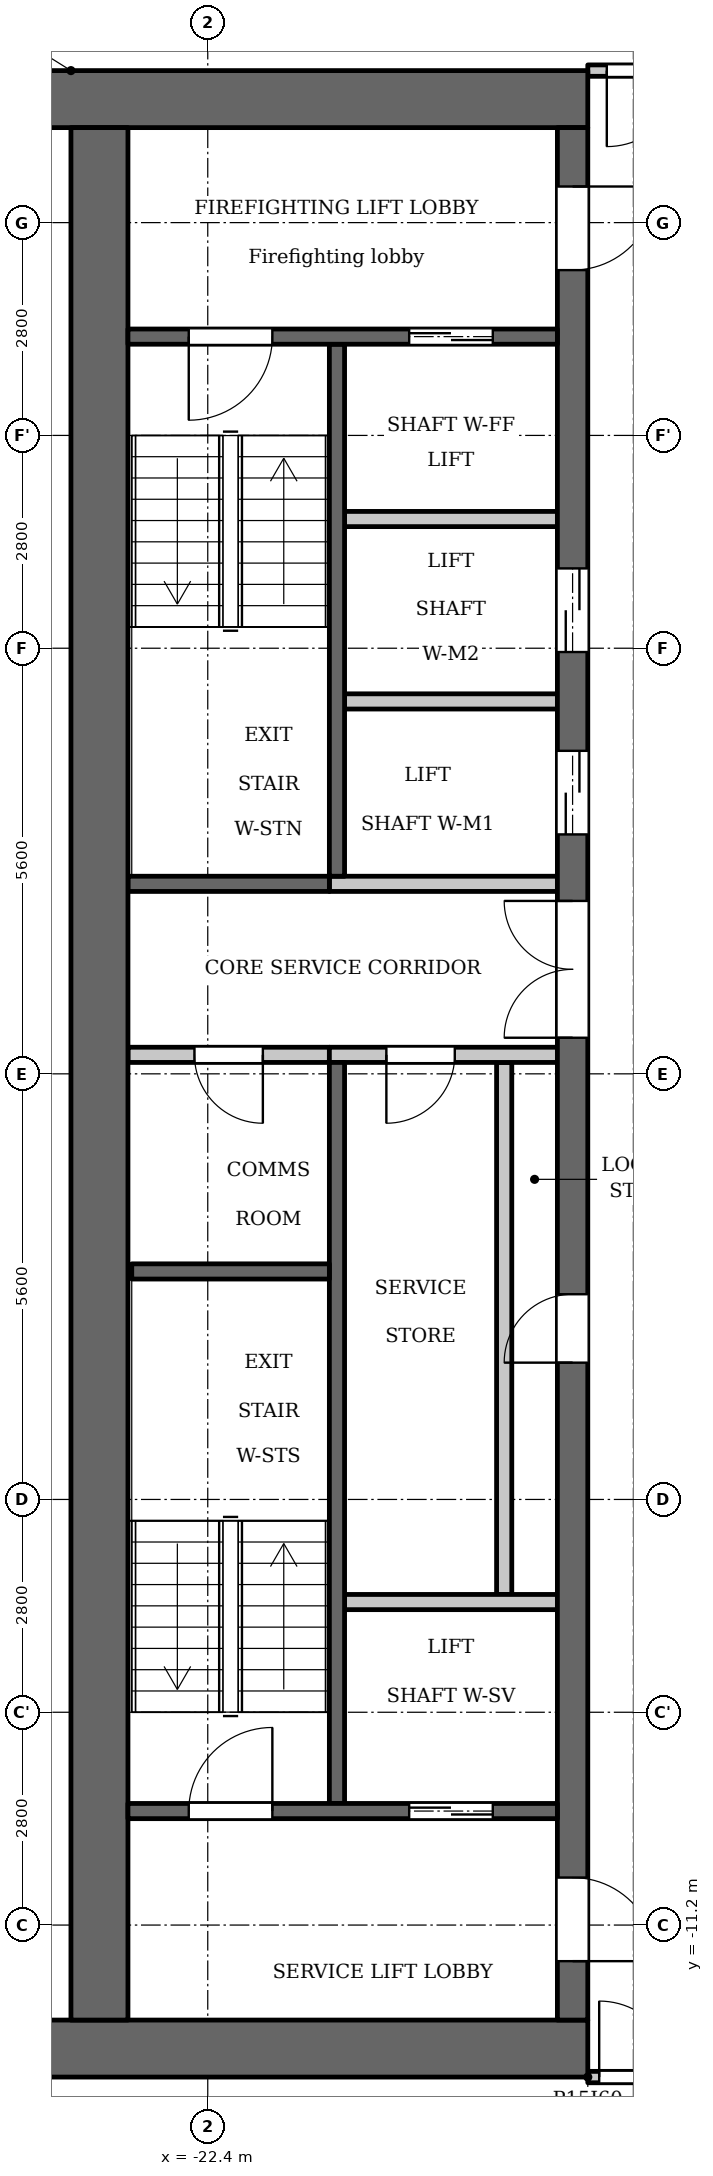
"""IFC4 building model, lengths in metres.
Left out: names, types, materials, properties, quantities, classifications, styles, units other than length and angle.
Written with IfcOpenShell. Run it as: python <this file> out.ifc"""

import sys

from ifc_helpers import new_model, si_unit, direction, frame, frame_2d, origin, place, context, subcontext, project, spatial, rectangle, extrude, element, fill, save


model = new_model("IFC4")
c1 = context("Model", 3, precision=1e-05, world=origin(), true_north=direction((0.0, 1.0)))
c2 = subcontext(c1, "Body", "Model", "MODEL_VIEW")
j1 = project(units=[si_unit("LENGTHUNIT", "METRE"), si_unit("PLANEANGLEUNIT", "RADIAN")], contexts=[c1])
p1 = place(None, origin())
s1 = spatial("IfcSite", under=j1, at=p1, CompositionType="ELEMENT")
p2 = place(p1, origin())
s2 = spatial("IfcBuilding", under=s1, at=p2, CompositionType="ELEMENT")
p3 = place(p2, frame((0.0, 0.0, 206.4)))
s3 = spatial("IfcBuildingStorey", under=s2, at=p3, CompositionType="ELEMENT", Elevation=206.4)
p4 = place(p3, frame((-20.7, 2.6, 0.0), z_axis=(0.0, 0.0, 1.0), x_axis=(0.0, 1.0, 0.0)))
e1 = element("IfcWall", 1, at=p4, inside=s3, PredefinedType="SHEAR", context=c2, shape_type="SweptSolid", body=[
    extrude(rectangle(XDim=7.0, YDim=0.2, at=frame_2d((3.5, 0.0))), origin(), (0.0, 0.0, 1.0), 3.2),
])
p5 = place(p3, frame((-20.7, -9.6, 0.0), z_axis=(0.0, 0.0, 1.0), x_axis=(0.0, 1.0, 0.0)))
e2 = element("IfcWall", 2, at=p5, inside=s3, PredefinedType="SHEAR", context=c2, shape_type="SweptSolid", body=[
    extrude(rectangle(XDim=9.75, YDim=0.2, at=frame_2d((4.875, 0.0))), origin(), (0.0, 0.0, 1.0), 3.2),
])
p6 = place(p3, frame((-20.8, 2.5, 0.0), z_axis=(0.0, 0.0, 1.0), x_axis=(-1.0, 0.0, 0.0)))
e3 = element("IfcWall", 3, at=p6, inside=s3, PredefinedType="SHEAR", context=c2, shape_type="SweptSolid", body=[
    extrude(rectangle(XDim=2.65, YDim=0.2, at=frame_2d((1.325, 0.0))), origin(), (0.0, 0.0, 1.0), 3.2),
])
p7 = place(p3, frame((-20.8, 0.25, 0.0), z_axis=(0.0, 0.0, 1.0), x_axis=(-1.0, 0.0, 0.0)))
e4 = element("IfcWall", 4, at=p7, inside=s3, PredefinedType="PARTITIONING", context=c2, shape_type="SweptSolid", body=[
    extrude(rectangle(XDim=2.65, YDim=0.2, at=frame_2d((1.325, 0.0))), origin(), (0.0, 0.0, 1.0), 3.2),
])
p8 = place(p7, frame((0.875, 0.0, 0.0)))
e5 = element("IfcOpeningElement", 5, at=p8, cuts=e4, PredefinedType="OPENING", context=c2, shape_type="SweptSolid", body=[
    extrude(rectangle(XDim=0.9, YDim=2.1, at=frame_2d((0.45, 1.05))), frame((0.0, 0.11, 0.0), z_axis=(0.0, -1.0, 0.0), x_axis=(1.0, 0.0, 0.0)), (0.0, 0.0, 1.0), 0.22),
])
for number, where, z_axis, x_axis in (
    (6, (-17.4, 12.825, 0.0), (0.0, 0.0, 1.0), (-1.0, 0.0, 0.0)),
    (7, (-17.4, -12.825, 0.0), (0.0, 0.0, 1.0), (-1.0, 0.0, 0.0)),
):
    element("IfcWall", number, at=place(p3, frame(where, z_axis=z_axis, x_axis=x_axis)), inside=s3, PredefinedType="SHEAR", context=c2, shape_type="SweptSolid", body=[
        extrude(rectangle(XDim=7.6, YDim=0.75, at=frame_2d((3.8, 0.0))), origin(), (0.0, 0.0, 1.0), 3.2),
    ])
p9 = place(p3, frame((-18.5, -6.85, 0.0), z_axis=(0.0, 0.0, 1.0), x_axis=(0.0, 1.0, 0.0)))
e8 = element("IfcWall", 8, at=p9, inside=s3, PredefinedType="PARTITIONING", context=c2, shape_type="SweptSolid", body=[
    extrude(rectangle(XDim=7.0, YDim=0.2, at=frame_2d((3.5, 0.0))), origin(), (0.0, 0.0, 1.0), 3.2),
])
p10 = place(p3, frame((-17.6, -12.45, 0.0), z_axis=(0.0, 0.0, 1.0), x_axis=(0.0, 1.0, 0.0)))
e9 = element("IfcWall", 9, at=p10, inside=s3, PredefinedType="SHEAR", context=c2, shape_type="SweptSolid", body=[
    extrude(rectangle(XDim=24.9, YDim=0.4, at=frame_2d((12.45, 0.0))), origin(), (0.0, 0.0, 1.0), 3.2),
])
p11 = place(p10, frame((8.65, 0.0, 0.0)))
e10 = element("IfcOpeningElement", 10, at=p11, cuts=e9, PredefinedType="OPENING", context=c2, shape_type="SweptSolid", body=[
    extrude(rectangle(XDim=0.9, YDim=2.1, at=frame_2d((0.45, 1.05))), frame((0.0, 0.21, 0.0), z_axis=(0.0, -1.0, 0.0), x_axis=(1.0, 0.0, 0.0)), (0.0, 0.0, 1.0), 0.42),
])
p12 = place(p10, frame((15.6, 0.0, 0.0)))
e11 = element("IfcOpeningElement", 11, at=p12, cuts=e9, PredefinedType="OPENING", context=c2, shape_type="SweptSolid", body=[
    extrude(rectangle(XDim=1.1, YDim=2.1, at=frame_2d((0.55, 1.05))), frame((0.0, 0.21, 0.0), z_axis=(0.0, -1.0, 0.0), x_axis=(1.0, 0.0, 0.0)), (0.0, 0.0, 1.0), 0.42),
])
p13 = place(p10, frame((18.0, 0.0, 0.0)))
e12 = element("IfcOpeningElement", 12, at=p13, cuts=e9, PredefinedType="OPENING", context=c2, shape_type="SweptSolid", body=[
    extrude(rectangle(XDim=1.1, YDim=2.1, at=frame_2d((0.55, 1.05))), frame((0.0, 0.21, 0.0), z_axis=(0.0, -1.0, 0.0), x_axis=(1.0, 0.0, 0.0)), (0.0, 0.0, 1.0), 0.42),
])
p14 = place(p10, frame((23.025, 0.0, 0.0)))
e13 = element("IfcOpeningElement", 13, at=p14, cuts=e9, PredefinedType="OPENING", context=c2, shape_type="SweptSolid", body=[
    extrude(rectangle(XDim=1.1, YDim=2.1, at=frame_2d((0.55, 1.05))), frame((0.0, 0.21, 0.0), z_axis=(0.0, -1.0, 0.0), x_axis=(1.0, 0.0, 0.0)), (0.0, 0.0, 1.0), 0.42),
])
p15 = place(p10, frame((0.775, 0.0, 0.0)))
e14 = element("IfcOpeningElement", 14, at=p15, cuts=e9, PredefinedType="OPENING", context=c2, shape_type="SweptSolid", body=[
    extrude(rectangle(XDim=1.1, YDim=2.1, at=frame_2d((0.55, 1.05))), frame((0.0, 0.21, 0.0), z_axis=(0.0, -1.0, 0.0), x_axis=(1.0, 0.0, 0.0)), (0.0, 0.0, 1.0), 0.42),
])
p16 = place(p10, frame((12.925, 0.0, 0.0)))
e15 = element("IfcOpeningElement", 15, at=p16, cuts=e9, PredefinedType="OPENING", context=c2, shape_type="SweptSolid", body=[
    extrude(rectangle(XDim=1.8, YDim=2.1, at=frame_2d((0.9, 1.05))), frame((0.0, 0.21, 0.0), z_axis=(0.0, -1.0, 0.0), x_axis=(1.0, 0.0, 0.0)), (0.0, 0.0, 1.0), 0.42),
])
p17 = place(p3, frame((-23.825, -12.45, 0.0), z_axis=(0.0, 0.0, 1.0), x_axis=(0.0, 1.0, 0.0)))
e16 = element("IfcWall", 16, at=p17, inside=s3, PredefinedType="SHEAR", context=c2, shape_type="SweptSolid", body=[
    extrude(rectangle(XDim=24.9, YDim=0.75, at=frame_2d((12.45, 0.0))), origin(), (0.0, 0.0, 1.0), 3.2),
])
p18 = place(p3, frame((-17.8, -9.7, 0.0), z_axis=(0.0, 0.0, 1.0), x_axis=(-1.0, 0.0, 0.0)))
e17 = element("IfcWall", 17, at=p18, inside=s3, PredefinedType="SHEAR", context=c2, shape_type="SweptSolid", body=[
    extrude(rectangle(XDim=5.65, YDim=0.2, at=frame_2d((2.825, 0.0))), origin(), (0.0, 0.0, 1.0), 3.2),
])
p19 = place(p18, frame((0.85, 0.0, 0.0)))
e18 = element("IfcOpeningElement", 18, at=p19, cuts=e17, PredefinedType="OPENING", context=c2, shape_type="SweptSolid", body=[
    extrude(rectangle(XDim=1.1, YDim=2.1, at=frame_2d((0.55, 1.05))), frame((0.0, 0.11, 0.0), z_axis=(0.0, -1.0, 0.0), x_axis=(1.0, 0.0, 0.0)), (0.0, 0.0, 1.0), 0.22),
])
p20 = place(p18, frame((3.75, 0.0, 0.0)))
e19 = element("IfcOpeningElement", 19, at=p20, cuts=e17, PredefinedType="OPENING", context=c2, shape_type="SweptSolid", body=[
    extrude(rectangle(XDim=1.1, YDim=2.1, at=frame_2d((0.55, 1.05))), frame((0.0, 0.11, 0.0), z_axis=(0.0, -1.0, 0.0), x_axis=(1.0, 0.0, 0.0)), (0.0, 0.0, 1.0), 0.22),
])
p21 = place(p3, frame((-17.8, -6.95, 0.0), z_axis=(0.0, 0.0, 1.0), x_axis=(-1.0, 0.0, 0.0)))
e20 = element("IfcWall", 20, at=p21, inside=s3, PredefinedType="PARTITIONING", context=c2, shape_type="SweptSolid", body=[
    extrude(rectangle(XDim=2.8, YDim=0.2, at=frame_2d((1.4, 0.0))), origin(), (0.0, 0.0, 1.0), 3.2),
])
p22 = place(p3, frame((-17.8, 0.25, 0.0), z_axis=(0.0, 0.0, 1.0), x_axis=(-1.0, 0.0, 0.0)))
e21 = element("IfcWall", 21, at=p22, inside=s3, PredefinedType="PARTITIONING", context=c2, shape_type="SweptSolid", body=[
    extrude(rectangle(XDim=3.0, YDim=0.2, at=frame_2d((1.5, 0.0))), origin(), (0.0, 0.0, 1.0), 3.2),
])
p23 = place(p22, frame((1.35, 0.0, 0.0)))
e22 = element("IfcOpeningElement", 22, at=p23, cuts=e21, PredefinedType="OPENING", context=c2, shape_type="SweptSolid", body=[
    extrude(rectangle(XDim=0.9, YDim=2.1, at=frame_2d((0.45, 1.05))), frame((0.0, 0.11, 0.0), z_axis=(0.0, -1.0, 0.0), x_axis=(1.0, 0.0, 0.0)), (0.0, 0.0, 1.0), 0.22),
])
p24 = place(p3, frame((-17.8, 2.5, 0.0), z_axis=(0.0, 0.0, 1.0), x_axis=(-1.0, 0.0, 0.0)))
e23 = element("IfcWall", 23, at=p24, inside=s3, PredefinedType="PARTITIONING", context=c2, shape_type="SweptSolid", body=[
    extrude(rectangle(XDim=3.0, YDim=0.2, at=frame_2d((1.5, 0.0))), origin(), (0.0, 0.0, 1.0), 3.2),
])
for number, where, z_axis, x_axis in (
    (24, (-17.8, 4.9, 0.0), (0.0, 0.0, 1.0), (-1.0, 0.0, 0.0)),
    (25, (-17.8, 7.3, 0.0), (0.0, 0.0, 1.0), (-1.0, 0.0, 0.0)),
):
    element("IfcWall", number, at=place(p3, frame(where, z_axis=z_axis, x_axis=x_axis)), inside=s3, PredefinedType="PARTITIONING", context=c2, shape_type="SweptSolid", body=[
        extrude(rectangle(XDim=2.8, YDim=0.2, at=frame_2d((1.4, 0.0))), origin(), (0.0, 0.0, 1.0), 3.2),
    ])
p25 = place(p3, frame((-17.8, 9.7, 0.0), z_axis=(0.0, 0.0, 1.0), x_axis=(-1.0, 0.0, 0.0)))
e26 = element("IfcWall", 26, at=p25, inside=s3, PredefinedType="SHEAR", context=c2, shape_type="SweptSolid", body=[
    extrude(rectangle(XDim=5.65, YDim=0.2, at=frame_2d((2.825, 0.0))), origin(), (0.0, 0.0, 1.0), 3.2),
])
p26 = place(p25, frame((0.85, 0.0, 0.0)))
e27 = element("IfcOpeningElement", 27, at=p26, cuts=e26, PredefinedType="OPENING", context=c2, shape_type="SweptSolid", body=[
    extrude(rectangle(XDim=1.1, YDim=2.1, at=frame_2d((0.55, 1.05))), frame((0.0, 0.11, 0.0), z_axis=(0.0, -1.0, 0.0), x_axis=(1.0, 0.0, 0.0)), (0.0, 0.0, 1.0), 0.22),
])
p27 = place(p25, frame((3.75, 0.0, 0.0)))
e28 = element("IfcOpeningElement", 28, at=p27, cuts=e26, PredefinedType="OPENING", context=c2, shape_type="SweptSolid", body=[
    extrude(rectangle(XDim=1.1, YDim=2.1, at=frame_2d((0.55, 1.05))), frame((0.0, 0.11, 0.0), z_axis=(0.0, -1.0, 0.0), x_axis=(1.0, 0.0, 0.0)), (0.0, 0.0, 1.0), 0.22),
])
p28 = place(p3, frame((-20.8, -2.6, 0.0), z_axis=(0.0, 0.0, 1.0), x_axis=(-1.0, 0.0, 0.0)))
e29 = element("IfcWall", 29, at=p28, inside=s3, PredefinedType="SHEAR", context=c2, shape_type="SweptSolid", body=[
    extrude(rectangle(XDim=2.6, YDim=0.2, at=frame_2d((1.3, 0.0))), origin(), (0.0, 0.0, 1.0), 3.2),
])
p29 = place(p3, frame((-17.4, -13.2, 0.0), z_axis=(0.0, 0.0, 1.0), x_axis=(1.0, 0.0, 0.0)))
e30 = element("IfcWall", 30, at=p29, inside=s3, PredefinedType="PARTITIONING", context=c2, shape_type="SweptSolid", body=[
    extrude(rectangle(XDim=34.8, YDim=0.15, at=frame_2d((17.4, 0.0))), origin(), (0.0, 0.0, 1.0), 3.2),
])
p30 = place(p29, frame((0.15, 0.0, 0.0)))
e31 = element("IfcOpeningElement", 31, at=p30, cuts=e30, PredefinedType="OPENING", context=c2, shape_type="SweptSolid", body=[
    extrude(rectangle(XDim=1.0, YDim=2.1, at=frame_2d((0.5, 1.05))), frame((0.0, 0.085, 0.0), z_axis=(0.0, -1.0, 0.0), x_axis=(1.0, 0.0, 0.0)), (0.0, 0.0, 1.0), 0.17),
])
p31 = place(p29, frame((33.55, 0.0, 0.0)))
e32 = element("IfcOpeningElement", 32, at=p31, cuts=e30, PredefinedType="OPENING", context=c2, shape_type="SweptSolid", body=[
    extrude(rectangle(XDim=1.0, YDim=2.1, at=frame_2d((0.5, 1.05))), frame((0.0, 0.085, 0.0), z_axis=(0.0, -1.0, 0.0), x_axis=(1.0, 0.0, 0.0)), (0.0, 0.0, 1.0), 0.17),
])
p32 = place(p3, frame((-17.4, 13.2, 0.0), z_axis=(0.0, 0.0, 1.0), x_axis=(1.0, 0.0, 0.0)))
e33 = element("IfcWall", 33, at=p32, inside=s3, PredefinedType="PARTITIONING", context=c2, shape_type="SweptSolid", body=[
    extrude(rectangle(XDim=34.8, YDim=0.15, at=frame_2d((17.4, 0.0))), origin(), (0.0, 0.0, 1.0), 3.2),
])
p33 = place(p32, frame((0.25, 0.0, 0.0)))
e34 = element("IfcOpeningElement", 34, at=p33, cuts=e33, PredefinedType="OPENING", context=c2, shape_type="SweptSolid", body=[
    extrude(rectangle(XDim=1.0, YDim=2.1, at=frame_2d((0.5, 1.05))), frame((0.0, 0.085, 0.0), z_axis=(0.0, -1.0, 0.0), x_axis=(1.0, 0.0, 0.0)), (0.0, 0.0, 1.0), 0.17),
])
p34 = place(p32, frame((33.65, 0.0, 0.0)))
e35 = element("IfcOpeningElement", 35, at=p34, cuts=e33, PredefinedType="OPENING", context=c2, shape_type="SweptSolid", body=[
    extrude(rectangle(XDim=1.0, YDim=2.1, at=frame_2d((0.5, 1.05))), frame((0.0, 0.085, 0.0), z_axis=(0.0, -1.0, 0.0), x_axis=(1.0, 0.0, 0.0)), (0.0, 0.0, 1.0), 0.17),
])
p35 = place(p19, origin())
e36 = element("IfcDoor", 36, at=p35, inside=s3, OperationType="DOUBLE_DOOR_SLIDING", PredefinedType="DOOR", context=c2, shape_type="SweptSolid", body=[
    extrude(rectangle(XDim=1.1, YDim=2.1, at=frame_2d((0.55, 1.05))), frame((0.0, 0.025, 0.0), z_axis=(0.0, -1.0, 0.0), x_axis=(1.0, 0.0, 0.0)), (0.0, 0.0, 1.0), 0.05),
])
fill(e18, e36)
p36 = place(p11, origin())
e37 = element("IfcDoor", 37, at=p36, inside=s3, OperationType="SINGLE_SWING_RIGHT", PredefinedType="DOOR", context=c2, shape_type="SweptSolid", body=[
    extrude(rectangle(XDim=0.9, YDim=2.1, at=frame_2d((0.45, 1.05))), frame((0.0, 0.025, 0.0), z_axis=(0.0, -1.0, 0.0), x_axis=(1.0, 0.0, 0.0)), (0.0, 0.0, 1.0), 0.05),
])
fill(e10, e37)
p37 = place(p23, origin())
e38 = element("IfcDoor", 38, at=p37, inside=s3, OperationType="SINGLE_SWING_LEFT", PredefinedType="DOOR", context=c2, shape_type="SweptSolid", body=[
    extrude(rectangle(XDim=0.9, YDim=2.1, at=frame_2d((0.45, 1.05))), frame((0.0, 0.025, 0.0), z_axis=(0.0, -1.0, 0.0), x_axis=(1.0, 0.0, 0.0)), (0.0, 0.0, 1.0), 0.05),
])
fill(e22, e38)
p38 = place(p12, origin())
e39 = element("IfcDoor", 39, at=p38, inside=s3, OperationType="DOUBLE_DOOR_SLIDING", PredefinedType="DOOR", context=c2, shape_type="SweptSolid", body=[
    extrude(rectangle(XDim=1.1, YDim=2.1, at=frame_2d((0.55, 1.05))), frame((0.0, 0.025, 0.0), z_axis=(0.0, -1.0, 0.0), x_axis=(1.0, 0.0, 0.0)), (0.0, 0.0, 1.0), 0.05),
])
fill(e11, e39)
p39 = place(p13, origin())
e40 = element("IfcDoor", 40, at=p39, inside=s3, OperationType="DOUBLE_DOOR_SLIDING", PredefinedType="DOOR", context=c2, shape_type="SweptSolid", body=[
    extrude(rectangle(XDim=1.1, YDim=2.1, at=frame_2d((0.55, 1.05))), frame((0.0, 0.025, 0.0), z_axis=(0.0, -1.0, 0.0), x_axis=(1.0, 0.0, 0.0)), (0.0, 0.0, 1.0), 0.05),
])
fill(e12, e40)
p40 = place(p26, origin())
e41 = element("IfcDoor", 41, at=p40, inside=s3, OperationType="DOUBLE_DOOR_SLIDING", PredefinedType="DOOR", context=c2, shape_type="SweptSolid", body=[
    extrude(rectangle(XDim=1.1, YDim=2.1, at=frame_2d((0.55, 1.05))), frame((0.0, 0.025, 0.0), z_axis=(0.0, -1.0, 0.0), x_axis=(1.0, 0.0, 0.0)), (0.0, 0.0, 1.0), 0.05),
])
fill(e27, e41)
p41 = place(p14, origin())
e42 = element("IfcDoor", 42, at=p41, inside=s3, OperationType="SINGLE_SWING_RIGHT", PredefinedType="DOOR", context=c2, shape_type="SweptSolid", body=[
    extrude(rectangle(XDim=1.1, YDim=2.1, at=frame_2d((0.55, 1.05))), frame((0.0, 0.025, 0.0), z_axis=(0.0, -1.0, 0.0), x_axis=(1.0, 0.0, 0.0)), (0.0, 0.0, 1.0), 0.05),
])
fill(e13, e42)
p42 = place(p15, origin())
e43 = element("IfcDoor", 43, at=p42, inside=s3, OperationType="SINGLE_SWING_LEFT", PredefinedType="DOOR", context=c2, shape_type="SweptSolid", body=[
    extrude(rectangle(XDim=1.1, YDim=2.1, at=frame_2d((0.55, 1.05))), frame((0.0, 0.025, 0.0), z_axis=(0.0, -1.0, 0.0), x_axis=(1.0, 0.0, 0.0)), (0.0, 0.0, 1.0), 0.05),
])
fill(e14, e43)
p43 = place(p27, origin())
e44 = element("IfcDoor", 44, at=p43, inside=s3, OperationType="SINGLE_SWING_LEFT", PredefinedType="DOOR", context=c2, shape_type="SweptSolid", body=[
    extrude(rectangle(XDim=1.1, YDim=2.1, at=frame_2d((0.55, 1.05))), frame((0.0, 0.025, 0.0), z_axis=(0.0, -1.0, 0.0), x_axis=(1.0, 0.0, 0.0)), (0.0, 0.0, 1.0), 0.05),
])
fill(e28, e44)
p44 = place(p20, origin())
e45 = element("IfcDoor", 45, at=p44, inside=s3, OperationType="SINGLE_SWING_LEFT", PredefinedType="DOOR", context=c2, shape_type="SweptSolid", body=[
    extrude(rectangle(XDim=1.1, YDim=2.1, at=frame_2d((0.55, 1.05))), frame((0.0, 0.025, 0.0), z_axis=(0.0, -1.0, 0.0), x_axis=(1.0, 0.0, 0.0)), (0.0, 0.0, 1.0), 0.05),
])
fill(e19, e45)
p45 = place(p16, origin())
e46 = element("IfcDoor", 46, at=p45, inside=s3, OperationType="DOUBLE_DOOR_SINGLE_SWING", PredefinedType="DOOR", context=c2, shape_type="SweptSolid", body=[
    extrude(rectangle(XDim=1.8, YDim=2.1, at=frame_2d((0.9, 1.05))), frame((0.0, 0.025, 0.0), z_axis=(0.0, -1.0, 0.0), x_axis=(1.0, 0.0, 0.0)), (0.0, 0.0, 1.0), 0.05),
])
fill(e15, e46)
p46 = place(p8, origin())
e47 = element("IfcDoor", 47, at=p46, inside=s3, OperationType="SINGLE_SWING_RIGHT", PredefinedType="DOOR", context=c2, shape_type="SweptSolid", body=[
    extrude(rectangle(XDim=0.9, YDim=2.1, at=frame_2d((0.45, 1.05))), frame((0.0, 0.025, 0.0), z_axis=(0.0, -1.0, 0.0), x_axis=(1.0, 0.0, 0.0)), (0.0, 0.0, 1.0), 0.05),
])
fill(e5, e47)
p47 = place(p33, origin())
e48 = element("IfcDoor", 48, at=p47, inside=s3, OperationType="SINGLE_SWING_LEFT", PredefinedType="DOOR", context=c2, shape_type="SweptSolid", body=[
    extrude(rectangle(XDim=1.0, YDim=2.1, at=frame_2d((0.5, 1.05))), frame((0.0, 0.025, 0.0), z_axis=(0.0, -1.0, 0.0), x_axis=(1.0, 0.0, 0.0)), (0.0, 0.0, 1.0), 0.05),
])
fill(e34, e48)
p48 = place(p30, origin())
e49 = element("IfcDoor", 49, at=p48, inside=s3, OperationType="SINGLE_SWING_RIGHT", PredefinedType="DOOR", context=c2, shape_type="SweptSolid", body=[
    extrude(rectangle(XDim=1.0, YDim=2.1, at=frame_2d((0.5, 1.05))), frame((0.0, 0.025, 0.0), z_axis=(0.0, -1.0, 0.0), x_axis=(1.0, 0.0, 0.0)), (0.0, 0.0, 1.0), 0.05),
])
fill(e31, e49)
save(model, sys.argv[1])
